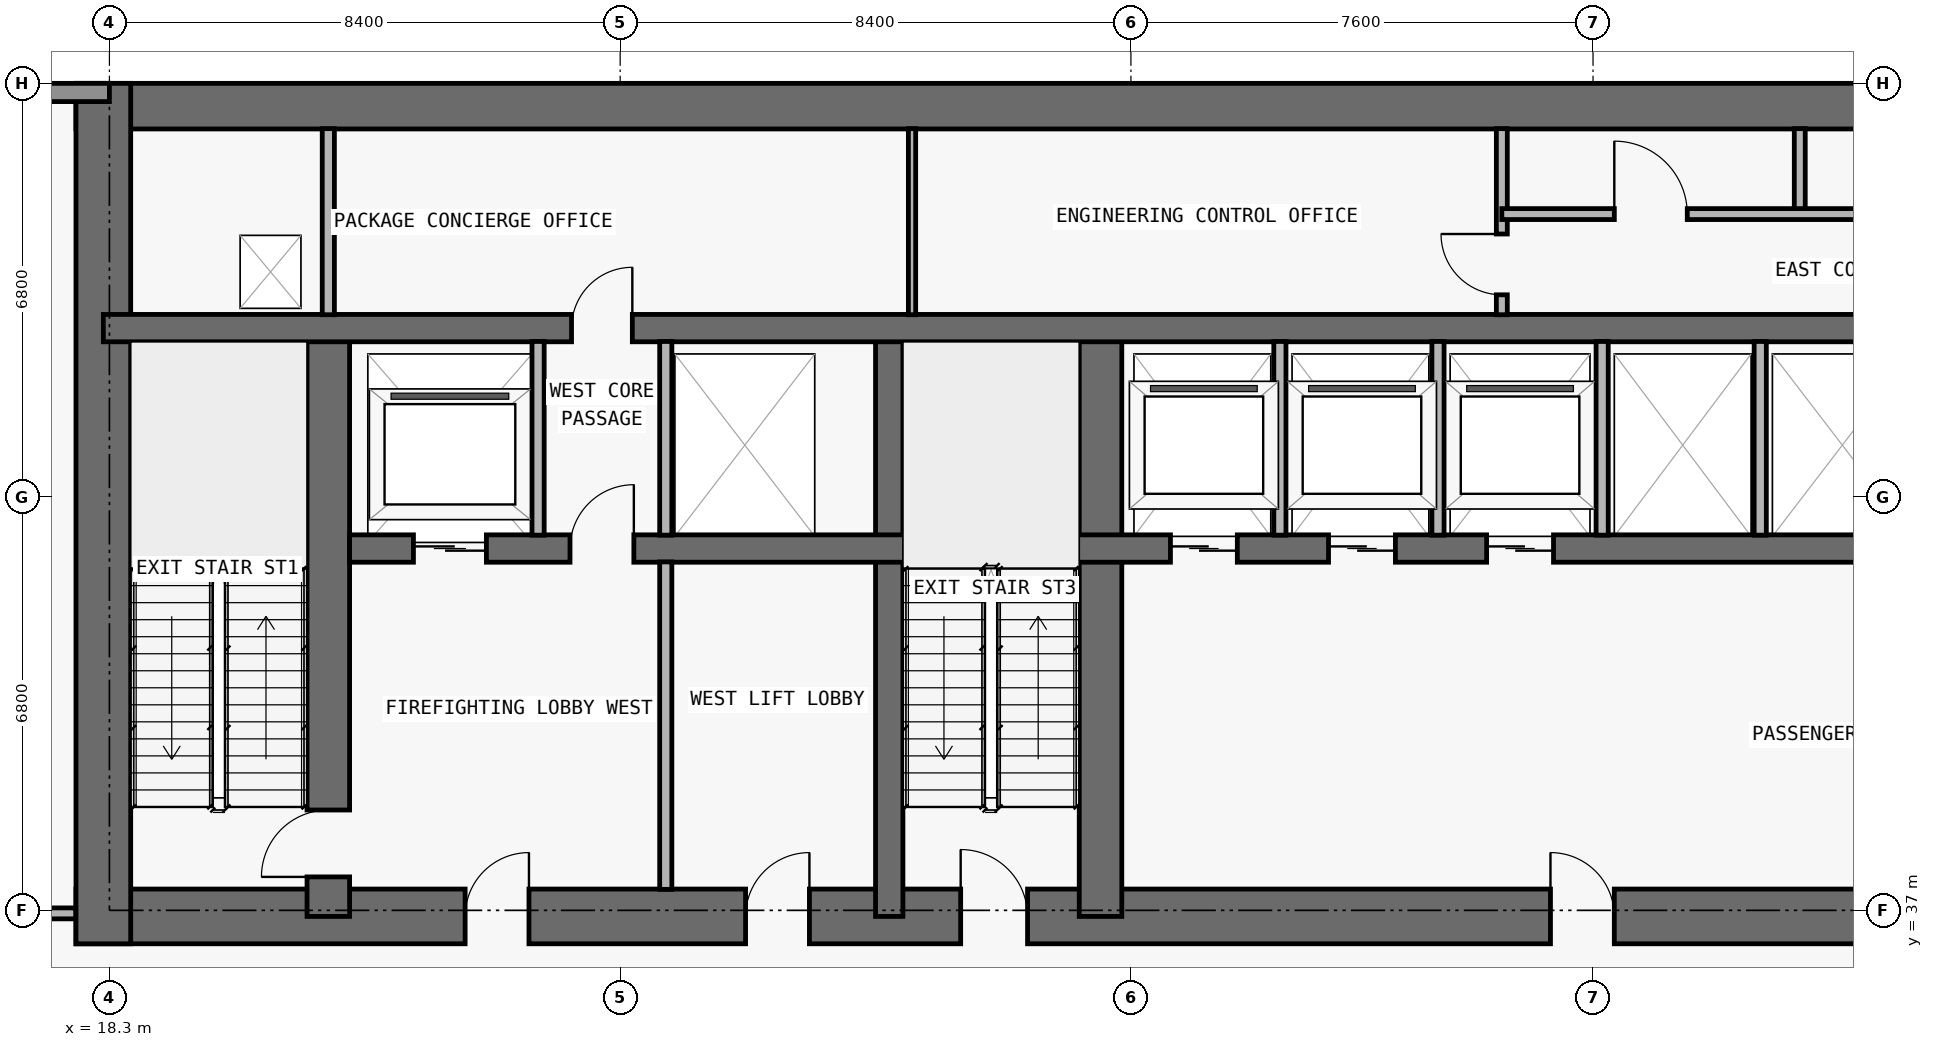
"""IFC4 building model, lengths in metres.
Left out: names, types, materials, properties, quantities, classifications, styles, units other than length and angle.
Written with IfcOpenShell. Run it as: python <this file> out.ifc"""

import sys

from ifc_helpers import new_model, si_unit, direction, frame, frame_2d, origin, place, context, subcontext, project, spatial, rectangle, extrude, element, fill, save


model = new_model("IFC4")
c1 = context("Model", 3, precision=1e-05, world=origin(), true_north=direction((0.0, 1.0)))
c2 = subcontext(c1, "Body", "Model", "MODEL_VIEW")
j1 = project(units=[si_unit("LENGTHUNIT", "METRE"), si_unit("PLANEANGLEUNIT", "RADIAN")], contexts=[c1])
p1 = place(None, origin())
s1 = spatial("IfcSite", under=j1, at=p1, CompositionType="ELEMENT")
p2 = place(p1, origin())
s2 = spatial("IfcBuilding", under=s1, at=p2, CompositionType="ELEMENT")
p3 = place(p2, frame((0.0, 0.0, 79.5)))
s3 = spatial("IfcBuildingStorey", under=s2, at=p3, CompositionType="ELEMENT", Elevation=79.5)
p4 = place(p3, frame((17.75, 36.9, 0.0), z_axis=(0.0, 0.0, 1.0), x_axis=(1.0, 0.0, 0.0)))
e1 = element("IfcWall", 1, at=p4, inside=s3, PredefinedType="SHEAR", context=c2, shape_type="SweptSolid", body=[
    extrude(rectangle(XDim=42.3, YDim=0.9, at=frame_2d((21.15, 0.0))), origin(), (0.0, 0.0, 1.0), 4.85),
])
p5 = place(p4, frame((14.55, 0.0, 0.0)))
e2 = element("IfcOpeningElement", 2, at=p5, cuts=e1, PredefinedType="OPENING", context=c2, shape_type="SweptSolid", body=[
    extrude(rectangle(XDim=1.1, YDim=2.15, at=frame_2d((0.55, 1.075))), frame((0.0, 0.46, 0.0), z_axis=(0.0, -1.0, 0.0), x_axis=(1.0, 0.0, 0.0)), (0.0, 0.0, 1.0), 0.92),
])
p6 = place(p4, frame((6.4, 0.0, 0.0)))
e3 = element("IfcOpeningElement", 3, at=p6, cuts=e1, PredefinedType="OPENING", context=c2, shape_type="SweptSolid", body=[
    extrude(rectangle(XDim=1.05, YDim=2.15, at=frame_2d((0.525, 1.075))), frame((0.0, 0.46, 0.0), z_axis=(0.0, -1.0, 0.0), x_axis=(1.0, 0.0, 0.0)), (0.0, 0.0, 1.0), 0.92),
])
p7 = place(p4, frame((34.9, 0.0, 0.0)))
e4 = element("IfcOpeningElement", 4, at=p7, cuts=e1, PredefinedType="OPENING", context=c2, shape_type="SweptSolid", body=[
    extrude(rectangle(XDim=1.05, YDim=2.15, at=frame_2d((0.525, 1.075))), frame((0.0, 0.46, 0.0), z_axis=(0.0, -1.0, 0.0), x_axis=(1.0, 0.0, 0.0)), (0.0, 0.0, 1.0), 0.92),
])
p8 = place(p4, frame((11.012, 0.0, 0.0)))
e5 = element("IfcOpeningElement", 5, at=p8, cuts=e1, PredefinedType="OPENING", context=c2, shape_type="SweptSolid", body=[
    extrude(rectangle(XDim=1.05, YDim=2.15, at=frame_2d((0.525, 1.075))), frame((0.0, 0.46, 0.0), z_axis=(0.0, -1.0, 0.0), x_axis=(1.0, 0.0, 0.0)), (0.0, 0.0, 1.0), 0.92),
])
p9 = place(p4, frame((24.25, 0.0, 0.0)))
e6 = element("IfcOpeningElement", 6, at=p9, cuts=e1, PredefinedType="OPENING", context=c2, shape_type="SweptSolid", body=[
    extrude(rectangle(XDim=1.05, YDim=2.15, at=frame_2d((0.525, 1.075))), frame((0.0, 0.46, 0.0), z_axis=(0.0, -1.0, 0.0), x_axis=(1.0, 0.0, 0.0)), (0.0, 0.0, 1.0), 0.92),
])
p10 = place(p3, frame((17.75, 50.225, 0.0), z_axis=(0.0, 0.0, 1.0), x_axis=(1.0, 0.0, 0.0)))
e7 = element("IfcWall", 7, at=p10, inside=s3, PredefinedType="SHEAR", context=c2, shape_type="SweptSolid", body=[
    extrude(rectangle(XDim=42.3, YDim=0.75, at=frame_2d((21.15, 0.0))), origin(), (0.0, 0.0, 1.0), 4.85),
])
p11 = place(p3, frame((18.2, 36.45, 0.0), z_axis=(0.0, 0.0, 1.0), x_axis=(0.0, 1.0, 0.0)))
e8 = element("IfcWall", 8, at=p11, inside=s3, PredefinedType="SHEAR", context=c2, shape_type="SweptSolid", body=[
    extrude(rectangle(XDim=14.15, YDim=0.9, at=frame_2d((7.075, 0.0))), origin(), (0.0, 0.0, 1.0), 4.85),
])
p12 = place(p3, frame((21.9, 36.9, 0.0), z_axis=(0.0, 0.0, 1.0), x_axis=(0.0, 1.0, 0.0)))
e9 = element("IfcWall", 9, at=p12, inside=s3, PredefinedType="SHEAR", context=c2, shape_type="SweptSolid", body=[
    extrude(rectangle(XDim=9.675, YDim=0.7, at=frame_2d((4.837, 0.0))), origin(), (0.0, 0.0, 1.0), 4.85),
])
p13 = place(p12, frame((0.65, 0.0, 0.0)))
e10 = element("IfcOpeningElement", 10, at=p13, cuts=e9, PredefinedType="OPENING", context=c2, shape_type="SweptSolid", body=[
    extrude(rectangle(XDim=1.1, YDim=2.15, at=frame_2d((0.55, 1.075))), frame((0.0, 0.36, 0.0), z_axis=(0.0, -1.0, 0.0), x_axis=(1.0, 0.0, 0.0)), (0.0, 0.0, 1.0), 0.72),
])
p14 = place(p3, frame((31.125, 36.9, 0.0), z_axis=(0.0, 0.0, 1.0), x_axis=(0.0, 1.0, 0.0)))
e11 = element("IfcWall", 11, at=p14, inside=s3, PredefinedType="SHEAR", context=c2, shape_type="SweptSolid", body=[
    extrude(rectangle(XDim=9.675, YDim=0.45, at=frame_2d((4.837, 0.0))), origin(), (0.0, 0.0, 1.0), 4.85),
])
p15 = place(p3, frame((34.6, 36.9, 0.0), z_axis=(0.0, 0.0, 1.0), x_axis=(0.0, 1.0, 0.0)))
e12 = element("IfcWall", 12, at=p15, inside=s3, PredefinedType="SHEAR", context=c2, shape_type="SweptSolid", body=[
    extrude(rectangle(XDim=9.675, YDim=0.7, at=frame_2d((4.837, 0.0))), origin(), (0.0, 0.0, 1.0), 4.85),
])
p16 = place(p3, frame((22.25, 42.95, 0.0), z_axis=(0.0, 0.0, 1.0), x_axis=(1.0, 0.0, 0.0)))
e13 = element("IfcWall", 13, at=p16, inside=s3, PredefinedType="SHEAR", context=c2, shape_type="SweptSolid", body=[
    extrude(rectangle(XDim=33.3, YDim=0.45, at=frame_2d((16.65, 0.0))), origin(), (0.0, 0.0, 1.0), 4.85),
])
p17 = place(p16, frame((1.05, 0.0, 0.0)))
e14 = element("IfcOpeningElement", 14, at=p17, cuts=e13, PredefinedType="OPENING", context=c2, shape_type="SweptSolid", body=[
    extrude(rectangle(XDim=1.2, YDim=2.2, at=frame_2d((0.6, 1.1))), frame((0.0, 0.235, 0.0), z_axis=(0.0, -1.0, 0.0), x_axis=(1.0, 0.0, 0.0)), (0.0, 0.0, 1.0), 0.47),
])
p18 = place(p16, frame((31.05, 0.0, 0.0)))
e15 = element("IfcOpeningElement", 15, at=p18, cuts=e13, PredefinedType="OPENING", context=c2, shape_type="SweptSolid", body=[
    extrude(rectangle(XDim=1.2, YDim=2.2, at=frame_2d((0.6, 1.1))), frame((0.0, 0.235, 0.0), z_axis=(0.0, -1.0, 0.0), x_axis=(1.0, 0.0, 0.0)), (0.0, 0.0, 1.0), 0.47),
])
p19 = place(p16, frame((13.5, 0.0, 0.0)))
e16 = element("IfcOpeningElement", 16, at=p19, cuts=e13, PredefinedType="OPENING", context=c2, shape_type="SweptSolid", body=[
    extrude(rectangle(XDim=1.1, YDim=2.2, at=frame_2d((0.55, 1.1))), frame((0.0, 0.235, 0.0), z_axis=(0.0, -1.0, 0.0), x_axis=(1.0, 0.0, 0.0)), (0.0, 0.0, 1.0), 0.47),
])
p20 = place(p16, frame((16.1, 0.0, 0.0)))
e17 = element("IfcOpeningElement", 17, at=p20, cuts=e13, PredefinedType="OPENING", context=c2, shape_type="SweptSolid", body=[
    extrude(rectangle(XDim=1.1, YDim=2.2, at=frame_2d((0.55, 1.1))), frame((0.0, 0.235, 0.0), z_axis=(0.0, -1.0, 0.0), x_axis=(1.0, 0.0, 0.0)), (0.0, 0.0, 1.0), 0.47),
])
p21 = place(p16, frame((18.7, 0.0, 0.0)))
e18 = element("IfcOpeningElement", 18, at=p21, cuts=e13, PredefinedType="OPENING", context=c2, shape_type="SweptSolid", body=[
    extrude(rectangle(XDim=1.1, YDim=2.2, at=frame_2d((0.55, 1.1))), frame((0.0, 0.235, 0.0), z_axis=(0.0, -1.0, 0.0), x_axis=(1.0, 0.0, 0.0)), (0.0, 0.0, 1.0), 0.47),
])
p22 = place(p16, frame((3.625, 0.0, 0.0)))
e19 = element("IfcOpeningElement", 19, at=p22, cuts=e13, PredefinedType="OPENING", context=c2, shape_type="SweptSolid", body=[
    extrude(rectangle(XDim=1.05, YDim=2.15, at=frame_2d((0.525, 1.075))), frame((0.0, 0.235, 0.0), z_axis=(0.0, -1.0, 0.0), x_axis=(1.0, 0.0, 0.0)), (0.0, 0.0, 1.0), 0.47),
])
p23 = place(p16, frame((28.675, 0.0, 0.0)))
e20 = element("IfcOpeningElement", 20, at=p23, cuts=e13, PredefinedType="OPENING", context=c2, shape_type="SweptSolid", body=[
    extrude(rectangle(XDim=1.05, YDim=2.15, at=frame_2d((0.525, 1.075))), frame((0.0, 0.235, 0.0), z_axis=(0.0, -1.0, 0.0), x_axis=(1.0, 0.0, 0.0)), (0.0, 0.0, 1.0), 0.47),
])
p24 = place(p3, frame((18.2, 46.575, 0.0), z_axis=(0.0, 0.0, 1.0), x_axis=(1.0, 0.0, 0.0)))
e21 = element("IfcWall", 21, at=p24, inside=s3, PredefinedType="SHEAR", context=c2, shape_type="SweptSolid", body=[
    extrude(rectangle(XDim=41.4, YDim=0.45, at=frame_2d((20.7, 0.0))), origin(), (0.0, 0.0, 1.0), 4.85),
])
p25 = place(p24, frame((7.7, 0.0, 0.0)))
e22 = element("IfcOpeningElement", 22, at=p25, cuts=e21, PredefinedType="OPENING", context=c2, shape_type="SweptSolid", body=[
    extrude(rectangle(XDim=1.0, YDim=2.2, at=frame_2d((0.5, 1.1))), frame((0.0, 0.235, 0.0), z_axis=(0.0, -1.0, 0.0), x_axis=(1.0, 0.0, 0.0)), (0.0, 0.0, 1.0), 0.47),
])
p26 = place(p24, frame((32.725, 0.0, 0.0)))
e23 = element("IfcOpeningElement", 23, at=p26, cuts=e21, PredefinedType="OPENING", context=c2, shape_type="SweptSolid", body=[
    extrude(rectangle(XDim=1.05, YDim=2.15, at=frame_2d((0.525, 1.075))), frame((0.0, 0.235, 0.0), z_axis=(0.0, -1.0, 0.0), x_axis=(1.0, 0.0, 0.0)), (0.0, 0.0, 1.0), 0.47),
])
p27 = place(p3, frame((5.1, 50.45, 0.0), z_axis=(0.0, 0.0, 1.0), x_axis=(1.0, 0.0, 0.0)))
e24 = element("IfcWall", 24, at=p27, inside=s3, PredefinedType="STANDARD", context=c2, shape_type="SweptSolid", body=[
    extrude(rectangle(XDim=13.2, YDim=0.3, at=frame_2d((6.6, 0.0))), origin(), (0.0, 0.0, 1.0), 4.85),
])
p28 = place(p27, frame((5.5, 0.0, 0.85)))
e25 = element("IfcOpeningElement", 25, at=p28, cuts=e24, PredefinedType="OPENING", context=c2, shape_type="SweptSolid", body=[
    extrude(rectangle(XDim=2.2, YDim=1.55, at=frame_2d((1.1, 0.775))), frame((0.0, 0.16, 0.0), z_axis=(0.0, -1.0, 0.0), x_axis=(1.0, 0.0, 0.0)), (0.0, 0.0, 1.0), 0.32),
])
p29 = place(p3, frame((21.9, 46.795, 0.0), z_axis=(0.0, 0.0, 1.0), x_axis=(0.0, 1.0, 0.0)))
e26 = element("IfcWall", 26, at=p29, inside=s3, PredefinedType="PARTITIONING", context=c2, shape_type="SweptSolid", body=[
    extrude(rectangle(XDim=3.06, YDim=0.2, at=frame_2d((1.53, 0.0))), origin(), (0.0, 0.0, 1.0), 4.85),
])
p30 = place(p3, frame((25.35, 43.17, 0.0), z_axis=(0.0, 0.0, 1.0), x_axis=(0.0, 1.0, 0.0)))
e27 = element("IfcWall", 27, at=p30, inside=s3, PredefinedType="PARTITIONING", context=c2, shape_type="SweptSolid", body=[
    extrude(rectangle(XDim=3.185, YDim=0.2, at=frame_2d((1.593, 0.0))), origin(), (0.0, 0.0, 1.0), 4.85),
])
p31 = place(p3, frame((27.45, 37.345, 0.0), z_axis=(0.0, 0.0, 1.0), x_axis=(0.0, 1.0, 0.0)))
e28 = element("IfcWall", 28, at=p31, inside=s3, PredefinedType="PARTITIONING", context=c2, shape_type="SweptSolid", body=[
    extrude(rectangle(XDim=5.385, YDim=0.2, at=frame_2d((2.692, 0.0))), origin(), (0.0, 0.0, 1.0), 4.85),
])
p32 = place(p3, frame((27.45, 43.17, 0.0), z_axis=(0.0, 0.0, 1.0), x_axis=(0.0, 1.0, 0.0)))
e29 = element("IfcWall", 29, at=p32, inside=s3, PredefinedType="PARTITIONING", context=c2, shape_type="SweptSolid", body=[
    extrude(rectangle(XDim=3.185, YDim=0.2, at=frame_2d((1.593, 0.0))), origin(), (0.0, 0.0, 1.0), 4.85),
])
p33 = place(p3, frame((31.5, 46.795, 0.0), z_axis=(0.0, 0.0, 1.0), x_axis=(0.0, 1.0, 0.0)))
e30 = element("IfcWall", 30, at=p33, inside=s3, PredefinedType="PARTITIONING", context=c2, shape_type="SweptSolid", body=[
    extrude(rectangle(XDim=3.06, YDim=0.12, at=frame_2d((1.53, 0.0))), origin(), (0.0, 0.0, 1.0), 4.85),
])
for number, where, z_axis, x_axis in (
    (31, (37.55, 43.17, 0.0), (0.0, 0.0, 1.0), (0.0, 1.0, 0.0)),
    (32, (40.15, 43.17, 0.0), (0.0, 0.0, 1.0), (0.0, 1.0, 0.0)),
):
    element("IfcWall", number, at=place(p3, frame(where, z_axis=z_axis, x_axis=x_axis)), inside=s3, PredefinedType="PARTITIONING", context=c2, shape_type="SweptSolid", body=[
        extrude(rectangle(XDim=3.185, YDim=0.2, at=frame_2d((1.593, 0.0))), origin(), (0.0, 0.0, 1.0), 4.85),
    ])
p34 = place(p3, frame((41.2, 46.795, 0.0), z_axis=(0.0, 0.0, 1.0), x_axis=(0.0, 1.0, 0.0)))
e33 = element("IfcWall", 33, at=p34, inside=s3, PredefinedType="PARTITIONING", context=c2, shape_type="SweptSolid", body=[
    extrude(rectangle(XDim=3.06, YDim=0.18, at=frame_2d((1.53, 0.0))), origin(), (0.0, 0.0, 1.0), 4.85),
])
p35 = place(p34, frame((0.327, 0.0, 0.0)))
e34 = element("IfcOpeningElement", 34, at=p35, cuts=e33, PredefinedType="OPENING", context=c2, shape_type="SweptSolid", body=[
    extrude(rectangle(XDim=1.0, YDim=2.2, at=frame_2d((0.5, 1.1))), frame((0.0, 0.1, 0.0), z_axis=(0.0, -1.0, 0.0), x_axis=(1.0, 0.0, 0.0)), (0.0, 0.0, 1.0), 0.2),
])
for number, where, z_axis, x_axis in (
    (35, (42.85, 43.17, 0.0), (0.0, 0.0, 1.0), (0.0, 1.0, 0.0)),
    (36, (45.45, 43.17, 0.0), (0.0, 0.0, 1.0), (0.0, 1.0, 0.0)),
):
    element("IfcWall", number, at=place(p3, frame(where, z_axis=z_axis, x_axis=x_axis)), inside=s3, PredefinedType="PARTITIONING", context=c2, shape_type="SweptSolid", body=[
        extrude(rectangle(XDim=3.185, YDim=0.2, at=frame_2d((1.593, 0.0))), origin(), (0.0, 0.0, 1.0), 4.85),
    ])
p36 = place(p3, frame((46.1, 48.45, 0.0), z_axis=(0.0, 0.0, 1.0), x_axis=(0.0, 1.0, 0.0)))
e37 = element("IfcWall", 37, at=p36, inside=s3, PredefinedType="PARTITIONING", context=c2, shape_type="SweptSolid", body=[
    extrude(rectangle(XDim=1.405, YDim=0.18, at=frame_2d((0.703, 0.0))), origin(), (0.0, 0.0, 1.0), 4.85),
])
p37 = place(p3, frame((5.1, 36.95, 0.0), z_axis=(0.0, 0.0, 1.0), x_axis=(1.0, 0.0, 0.0)))
e38 = element("IfcWall", 38, at=p37, inside=s3, PredefinedType="PARTITIONING", context=c2, shape_type="SweptSolid", body=[
    extrude(rectangle(XDim=12.645, YDim=0.18, at=frame_2d((6.323, 0.0))), origin(), (0.0, 0.0, 1.0), 4.85),
])
p38 = place(p37, frame((5.722, 0.0, 0.0)))
e39 = element("IfcOpeningElement", 39, at=p38, cuts=e38, PredefinedType="OPENING", context=c2, shape_type="SweptSolid", body=[
    extrude(rectangle(XDim=1.2, YDim=2.2, at=frame_2d((0.6, 1.1))), frame((0.0, 0.1, 0.0), z_axis=(0.0, -1.0, 0.0), x_axis=(1.0, 0.0, 0.0)), (0.0, 0.0, 1.0), 0.2),
])
p39 = place(p3, frame((41.2, 48.45, 0.0), z_axis=(0.0, 0.0, 1.0), x_axis=(1.0, 0.0, 0.0)))
e40 = element("IfcWall", 40, at=p39, inside=s3, PredefinedType="PARTITIONING", context=c2, shape_type="SweptSolid", body=[
    extrude(rectangle(XDim=14.7, YDim=0.18, at=frame_2d((7.35, 0.0))), origin(), (0.0, 0.0, 1.0), 4.85),
])
p40 = place(p39, frame((1.85, 0.0, 0.0)))
e41 = element("IfcOpeningElement", 41, at=p40, cuts=e40, PredefinedType="OPENING", context=c2, shape_type="SweptSolid", body=[
    extrude(rectangle(XDim=1.2, YDim=2.2, at=frame_2d((0.6, 1.1))), frame((0.0, 0.1, 0.0), z_axis=(0.0, -1.0, 0.0), x_axis=(1.0, 0.0, 0.0)), (0.0, 0.0, 1.0), 0.2),
])
p41 = place(p39, frame((6.75, 0.0, 0.0)))
e42 = element("IfcOpeningElement", 42, at=p41, cuts=e40, PredefinedType="OPENING", context=c2, shape_type="SweptSolid", body=[
    extrude(rectangle(XDim=1.2, YDim=2.2, at=frame_2d((0.6, 1.1))), frame((0.0, 0.1, 0.0), z_axis=(0.0, -1.0, 0.0), x_axis=(1.0, 0.0, 0.0)), (0.0, 0.0, 1.0), 0.2),
])
p42 = place(p39, frame((11.825, 0.0, 0.0)))
e43 = element("IfcOpeningElement", 43, at=p42, cuts=e40, PredefinedType="OPENING", context=c2, shape_type="SweptSolid", body=[
    extrude(rectangle(XDim=0.85, YDim=2.1, at=frame_2d((0.425, 1.05))), frame((0.0, 0.1, 0.0), z_axis=(0.0, -1.0, 0.0), x_axis=(1.0, 0.0, 0.0)), (0.0, 0.0, 1.0), 0.2),
])
p43 = place(p17, origin())
e44 = element("IfcDoor", 44, at=p43, inside=s3, OperationType="DOUBLE_DOOR_SLIDING", PredefinedType="DOOR", context=c2, shape_type="SweptSolid", body=[
    extrude(rectangle(XDim=1.2, YDim=2.2, at=frame_2d((0.6, 1.1))), frame((0.0, 0.025, 0.0), z_axis=(0.0, -1.0, 0.0), x_axis=(1.0, 0.0, 0.0)), (0.0, 0.0, 1.0), 0.05),
])
fill(e14, e44)
p44 = place(p19, origin())
e45 = element("IfcDoor", 45, at=p44, inside=s3, OperationType="DOUBLE_DOOR_SLIDING", PredefinedType="DOOR", context=c2, shape_type="SweptSolid", body=[
    extrude(rectangle(XDim=1.1, YDim=2.2, at=frame_2d((0.55, 1.1))), frame((0.0, 0.025, 0.0), z_axis=(0.0, -1.0, 0.0), x_axis=(1.0, 0.0, 0.0)), (0.0, 0.0, 1.0), 0.05),
])
fill(e16, e45)
p45 = place(p20, origin())
e46 = element("IfcDoor", 46, at=p45, inside=s3, OperationType="DOUBLE_DOOR_SLIDING", PredefinedType="DOOR", context=c2, shape_type="SweptSolid", body=[
    extrude(rectangle(XDim=1.1, YDim=2.2, at=frame_2d((0.55, 1.1))), frame((0.0, 0.025, 0.0), z_axis=(0.0, -1.0, 0.0), x_axis=(1.0, 0.0, 0.0)), (0.0, 0.0, 1.0), 0.05),
])
fill(e17, e46)
p46 = place(p21, origin())
e47 = element("IfcDoor", 47, at=p46, inside=s3, OperationType="DOUBLE_DOOR_SLIDING", PredefinedType="DOOR", context=c2, shape_type="SweptSolid", body=[
    extrude(rectangle(XDim=1.1, YDim=2.2, at=frame_2d((0.55, 1.1))), frame((0.0, 0.025, 0.0), z_axis=(0.0, -1.0, 0.0), x_axis=(1.0, 0.0, 0.0)), (0.0, 0.0, 1.0), 0.05),
])
fill(e18, e47)
p47 = place(p5, origin())
e48 = element("IfcDoor", 48, at=p47, inside=s3, OperationType="SINGLE_SWING_LEFT", PredefinedType="DOOR", context=c2, shape_type="SweptSolid", body=[
    extrude(rectangle(XDim=1.1, YDim=2.15, at=frame_2d((0.55, 1.075))), frame((0.0, 0.025, 0.0), z_axis=(0.0, -1.0, 0.0), x_axis=(1.0, 0.0, 0.0)), (0.0, 0.0, 1.0), 0.05),
])
fill(e2, e48)
p48 = place(p6, origin())
e49 = element("IfcDoor", 49, at=p48, inside=s3, OperationType="SINGLE_SWING_RIGHT", PredefinedType="DOOR", context=c2, shape_type="SweptSolid", body=[
    extrude(rectangle(XDim=1.05, YDim=2.15, at=frame_2d((0.525, 1.075))), frame((0.0, 0.025, 0.0), z_axis=(0.0, -1.0, 0.0), x_axis=(1.0, 0.0, 0.0)), (0.0, 0.0, 1.0), 0.05),
])
fill(e3, e49)
p49 = place(p13, origin())
e50 = element("IfcDoor", 50, at=p49, inside=s3, OperationType="SINGLE_SWING_LEFT", PredefinedType="DOOR", context=c2, shape_type="SweptSolid", body=[
    extrude(rectangle(XDim=1.1, YDim=2.15, at=frame_2d((0.55, 1.075))), frame((0.0, 0.025, 0.0), z_axis=(0.0, -1.0, 0.0), x_axis=(1.0, 0.0, 0.0)), (0.0, 0.0, 1.0), 0.05),
])
fill(e10, e50)
p50 = place(p22, origin())
e51 = element("IfcDoor", 51, at=p50, inside=s3, OperationType="SINGLE_SWING_RIGHT", PredefinedType="DOOR", context=c2, shape_type="SweptSolid", body=[
    extrude(rectangle(XDim=1.05, YDim=2.15, at=frame_2d((0.525, 1.075))), frame((0.0, 0.025, 0.0), z_axis=(0.0, -1.0, 0.0), x_axis=(1.0, 0.0, 0.0)), (0.0, 0.0, 1.0), 0.05),
])
fill(e19, e51)
p51 = place(p8, origin())
e52 = element("IfcDoor", 52, at=p51, inside=s3, OperationType="SINGLE_SWING_RIGHT", PredefinedType="DOOR", context=c2, shape_type="SweptSolid", body=[
    extrude(rectangle(XDim=1.05, YDim=2.15, at=frame_2d((0.525, 1.075))), frame((0.0, 0.025, 0.0), z_axis=(0.0, -1.0, 0.0), x_axis=(1.0, 0.0, 0.0)), (0.0, 0.0, 1.0), 0.05),
])
fill(e5, e52)
p52 = place(p9, origin())
e53 = element("IfcDoor", 53, at=p52, inside=s3, OperationType="SINGLE_SWING_LEFT", PredefinedType="DOOR", context=c2, shape_type="SweptSolid", body=[
    extrude(rectangle(XDim=1.05, YDim=2.15, at=frame_2d((0.525, 1.075))), frame((0.0, 0.025, 0.0), z_axis=(0.0, -1.0, 0.0), x_axis=(1.0, 0.0, 0.0)), (0.0, 0.0, 1.0), 0.05),
])
fill(e6, e53)
p53 = place(p25, origin())
e54 = element("IfcDoor", 54, at=p53, inside=s3, OperationType="SINGLE_SWING_RIGHT", PredefinedType="DOOR", context=c2, shape_type="SweptSolid", body=[
    extrude(rectangle(XDim=1.0, YDim=2.2, at=frame_2d((0.5, 1.1))), frame((0.0, 0.025, 0.0), z_axis=(0.0, -1.0, 0.0), x_axis=(1.0, 0.0, 0.0)), (0.0, 0.0, 1.0), 0.05),
])
fill(e22, e54)
p54 = place(p35, origin())
e55 = element("IfcDoor", 55, at=p54, inside=s3, OperationType="SINGLE_SWING_RIGHT", PredefinedType="DOOR", context=c2, shape_type="SweptSolid", body=[
    extrude(rectangle(XDim=1.0, YDim=2.2, at=frame_2d((0.5, 1.1))), frame((0.0, 0.025, 0.0), z_axis=(0.0, -1.0, 0.0), x_axis=(1.0, 0.0, 0.0)), (0.0, 0.0, 1.0), 0.05),
])
fill(e34, e55)
p55 = place(p40, origin())
e56 = element("IfcDoor", 56, at=p55, inside=s3, OperationType="SINGLE_SWING_LEFT", PredefinedType="DOOR", context=c2, shape_type="SweptSolid", body=[
    extrude(rectangle(XDim=1.2, YDim=2.2, at=frame_2d((0.6, 1.1))), frame((0.0, 0.025, 0.0), z_axis=(0.0, -1.0, 0.0), x_axis=(1.0, 0.0, 0.0)), (0.0, 0.0, 1.0), 0.05),
])
fill(e41, e56)
save(model, sys.argv[1])
